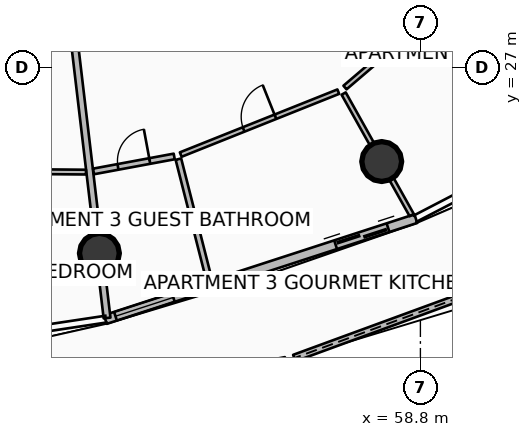
"""IFC4 building model, lengths in metres.
Left out: names, types, materials, properties, quantities, classifications, styles, units other than length and angle.
Written with IfcOpenShell. Run it as: python <this file> out.ifc"""

import sys

from ifc_helpers import new_model, si_unit, direction, frame, frame_2d, origin, origin_2d, place, context, subcontext, project, spatial, polyline, rectangle, circle, outline, extrude, element, fill, save


model = new_model("IFC4")
c1 = context("Model", 3, precision=1e-05, world=origin(), true_north=direction((0.0, 1.0)))
c2 = subcontext(c1, "Body", "Model", "MODEL_VIEW")
j1 = project(units=[si_unit("LENGTHUNIT", "METRE"), si_unit("PLANEANGLEUNIT", "RADIAN")], contexts=[c1])
p1 = place(None, origin())
s1 = spatial("IfcSite", under=j1, at=p1, CompositionType="ELEMENT")
p2 = place(p1, origin())
s2 = spatial("IfcBuilding", under=s1, at=p2, CompositionType="ELEMENT")
p3 = place(p2, frame((0.0, 0.0, 161.55)))
s3 = spatial("IfcBuildingStorey", under=s2, at=p3, CompositionType="ELEMENT", Elevation=161.55)
for number, where, z_axis, x_axis in (
    (1, (50.353, 22.119, 0.0), (0.0, 0.0, 1.0), (1.0, 0.0, 0.0)),
    (2, (57.782, 24.533, 0.0), (0.0, 0.0, 1.0), (1.0, 0.0, 0.0)),
):
    element("IfcColumn", number, at=place(p3, frame(where, z_axis=z_axis, x_axis=x_axis)), inside=s3, PredefinedType="COLUMN", context=c2, shape_type="SweptSolid", body=[
        extrude(circle(Radius=0.525, at=origin_2d()), origin(), (0.0, 0.0, 1.0), 3.5),
    ])
p4 = place(p3, frame((55.482, 19.362, 0.0), z_axis=(0.0, 0.0, 1.0), x_axis=(0.93889246029, 0.344210615774, 0.0)))
e3 = element("IfcWall", 3, at=p4, inside=s3, PredefinedType="PARAPET", context=c2, shape_type="SweptSolid", body=[
    extrude(outline(polyline([(0.0, 0.0), (9.449, 0.0), (9.449, 1.86), (4.725, 1.798), (0.0, 1.632), (0.0, 0.0)])), frame((0.0, 0.09, 0.0), z_axis=(0.0, -1.0, 0.0), x_axis=(1.0, 0.0, 0.0)), (0.0, 0.0, 1.0), 0.18),
])
p5 = place(p3, frame((50.51, 20.376, 0.0), z_axis=(0.0, 0.0, 1.0), x_axis=(0.951046390632, 0.309048156224, 0.0)))
e4 = element("IfcWall", 4, at=p5, inside=s3, PredefinedType="SOLIDWALL", context=c2, shape_type="SweptSolid", body=[
    extrude(rectangle(XDim=8.59, YDim=0.24, at=frame_2d((4.295, 0.0))), origin(), (0.0, 0.0, 1.0), 2.45),
])
p6 = place(p5, frame((6.37, 0.0, 0.0)))
e5 = element("IfcOpeningElement", 5, at=p6, cuts=e4, PredefinedType="OPENING", context=c2, shape_type="SweptSolid", body=[
    extrude(rectangle(XDim=1.45, YDim=2.15, at=frame_2d((0.725, 1.075))), frame((0.0, 0.13, 0.0), z_axis=(0.0, -1.0, 0.0), x_axis=(1.0, 0.0, 0.0)), (0.0, 0.0, 1.0), 0.26),
])
p7 = place(p5, frame((0.28, 0.0, 0.65)))
e6 = element("IfcOpeningElement", 6, at=p7, cuts=e4, PredefinedType="OPENING", context=c2, shape_type="SweptSolid", body=[
    extrude(rectangle(XDim=1.6, YDim=1.5, at=frame_2d((0.8, 0.75))), frame((0.0, 0.13, 0.0), z_axis=(0.0, -1.0, 0.0), x_axis=(1.0, 0.0, 0.0)), (0.0, 0.0, 1.0), 0.26),
])
p8 = place(p3, frame((49.054, 33.091, 0.0), z_axis=(0.0, 0.0, 1.0), x_axis=(0.117543744731, -0.993067705685, 0.0)))
e7 = element("IfcWall", 7, at=p8, inside=s3, PredefinedType="PARTITIONING", context=c2, shape_type="SweptSolid", body=[
    extrude(rectangle(XDim=12.763, YDim=0.18, at=frame_2d((6.382, 0.0))), origin(), (0.0, 0.0, 1.0), 2.94),
])
p9 = place(p3, frame((45.687, 24.29, 0.0), z_axis=(0.0, 0.0, 1.0), x_axis=(0.999965854942, -0.008263712844, 0.0)))
e8 = element("IfcWall", 8, at=p9, inside=s3, PredefinedType="PARTITIONING", context=c2, shape_type="SweptSolid", body=[
    extrude(rectangle(XDim=4.313, YDim=0.125, at=frame_2d((2.157, 0.0))), origin(), (0.0, 0.0, 1.0), 2.94),
])
p10 = place(p9, frame((1.707, 0.0, 0.0)))
e9 = element("IfcOpeningElement", 9, at=p10, cuts=e8, PredefinedType="OPENING", context=c2, shape_type="SweptSolid", body=[
    extrude(rectangle(XDim=0.9, YDim=2.08, at=frame_2d((0.45, 1.04))), frame((0.0, 0.073, 0.0), z_axis=(0.0, -1.0, 0.0), x_axis=(1.0, 0.0, 0.0)), (0.0, 0.0, 1.0), 0.145),
])
p11 = place(p3, frame((50.199, 24.272, 0.0), z_axis=(0.0, 0.0, 1.0), x_axis=(0.98320468223, 0.182506309042, 0.0)))
e10 = element("IfcWall", 10, at=p11, inside=s3, PredefinedType="PARTITIONING", context=c2, shape_type="SweptSolid", body=[
    extrude(rectangle(XDim=2.159, YDim=0.15, at=frame_2d((1.08, 0.0))), origin(), (0.0, 0.0, 1.0), 2.94),
])
p12 = place(p11, frame((0.655, 0.0, 0.0)))
e11 = element("IfcOpeningElement", 11, at=p12, cuts=e10, PredefinedType="OPENING", context=c2, shape_type="SweptSolid", body=[
    extrude(rectangle(XDim=0.85, YDim=2.06, at=frame_2d((0.425, 1.03))), frame((0.0, 0.085, 0.0), z_axis=(0.0, -1.0, 0.0), x_axis=(1.0, 0.0, 0.0)), (0.0, 0.0, 1.0), 0.17),
])
p13 = place(p3, frame((52.432, 24.595, 0.0), z_axis=(0.0, 0.0, 1.0), x_axis=(0.246779038105, -0.969071775645, 0.0)))
e12 = element("IfcWall", 12, at=p13, inside=s3, PredefinedType="PARTITIONING", context=c2, shape_type="SweptSolid", body=[
    extrude(rectangle(XDim=3.301, YDim=0.15, at=frame_2d((1.651, 0.0))), origin(), (0.0, 0.0, 1.0), 2.94),
])
p14 = place(p3, frame((52.494, 24.716, 0.0), z_axis=(0.0, 0.0, 1.0), x_axis=(0.928695316587, 0.370843644882, 0.0)))
e13 = element("IfcWall", 13, at=p14, inside=s3, PredefinedType="PARTITIONING", context=c2, shape_type="SweptSolid", body=[
    extrude(rectangle(XDim=4.464, YDim=0.125, at=frame_2d((2.232, 0.0))), origin(), (0.0, 0.0, 1.0), 2.94),
])
p15 = place(p14, frame((1.782, 0.0, 0.0)))
e14 = element("IfcOpeningElement", 14, at=p15, cuts=e13, PredefinedType="OPENING", context=c2, shape_type="SweptSolid", body=[
    extrude(rectangle(XDim=0.9, YDim=2.08, at=frame_2d((0.45, 1.04))), frame((0.0, 0.073, 0.0), z_axis=(0.0, -1.0, 0.0), x_axis=(1.0, 0.0, 0.0)), (0.0, 0.0, 1.0), 0.145),
])
p16 = place(p3, frame((56.781, 26.321, 0.0), z_axis=(0.0, 0.0, 1.0), x_axis=(0.488615541235, -0.872499199348, 0.0)))
e15 = element("IfcWall", 15, at=p16, inside=s3, PredefinedType="PARTITIONING", context=c2, shape_type="SweptSolid", body=[
    extrude(rectangle(XDim=3.665, YDim=0.125, at=frame_2d((1.832, 0.0))), origin(), (0.0, 0.0, 1.0), 2.94),
])
p17 = place(p3, frame((56.815, 26.48, 0.0), z_axis=(0.0, 0.0, 1.0), x_axis=(0.760406411553, 0.649447526186, 0.0)))
e16 = element("IfcWall", 16, at=p17, inside=s3, PredefinedType="PARTITIONING", context=c2, shape_type="SweptSolid", body=[
    extrude(rectangle(XDim=6.753, YDim=0.125, at=frame_2d((3.376, 0.0))), origin(), (0.0, 0.0, 1.0), 2.94),
])
p18 = place(p17, frame((2.926, 0.0, 0.0)))
e17 = element("IfcOpeningElement", 17, at=p18, cuts=e16, PredefinedType="OPENING", context=c2, shape_type="SweptSolid", body=[
    extrude(rectangle(XDim=0.9, YDim=2.08, at=frame_2d((0.45, 1.04))), frame((0.0, 0.073, 0.0), z_axis=(0.0, -1.0, 0.0), x_axis=(1.0, 0.0, 0.0)), (0.0, 0.0, 1.0), 0.145),
])
p19 = place(p6, origin())
e18 = element("IfcDoor", 18, at=p19, inside=s3, OperationType="DOUBLE_DOOR_SLIDING", PredefinedType="DOOR", context=c2, shape_type="SweptSolid", body=[
    extrude(rectangle(XDim=1.45, YDim=2.15, at=frame_2d((0.725, 1.075))), frame((0.0, 0.025, 0.0), z_axis=(0.0, -1.0, 0.0), x_axis=(1.0, 0.0, 0.0)), (0.0, 0.0, 1.0), 0.05),
])
fill(e5, e18)
p20 = place(p7, origin())
e19 = element("IfcWindow", 19, at=p20, inside=s3, PartitioningType="SINGLE_PANEL", PredefinedType="WINDOW", context=c2, shape_type="SweptSolid", body=[
    extrude(rectangle(XDim=1.6, YDim=1.5, at=frame_2d((0.8, 0.75))), frame((0.0, 0.03, 0.0), z_axis=(0.0, -1.0, 0.0), x_axis=(1.0, 0.0, 0.0)), (0.0, 0.0, 1.0), 0.06),
])
fill(e6, e19)
p21 = place(p12, origin())
e20 = element("IfcDoor", 20, at=p21, inside=s3, OperationType="SINGLE_SWING_RIGHT", PredefinedType="DOOR", context=c2, shape_type="SweptSolid", body=[
    extrude(rectangle(XDim=0.85, YDim=2.06, at=frame_2d((0.425, 1.03))), frame((0.0, 0.025, 0.0), z_axis=(0.0, -1.0, 0.0), x_axis=(1.0, 0.0, 0.0)), (0.0, 0.0, 1.0), 0.05),
])
fill(e11, e20)
p22 = place(p15, origin())
e21 = element("IfcDoor", 21, at=p22, inside=s3, OperationType="SINGLE_SWING_RIGHT", PredefinedType="DOOR", context=c2, shape_type="SweptSolid", body=[
    extrude(rectangle(XDim=0.9, YDim=2.08, at=frame_2d((0.45, 1.04))), frame((0.0, 0.025, 0.0), z_axis=(0.0, -1.0, 0.0), x_axis=(1.0, 0.0, 0.0)), (0.0, 0.0, 1.0), 0.05),
])
fill(e14, e21)
save(model, sys.argv[1])
